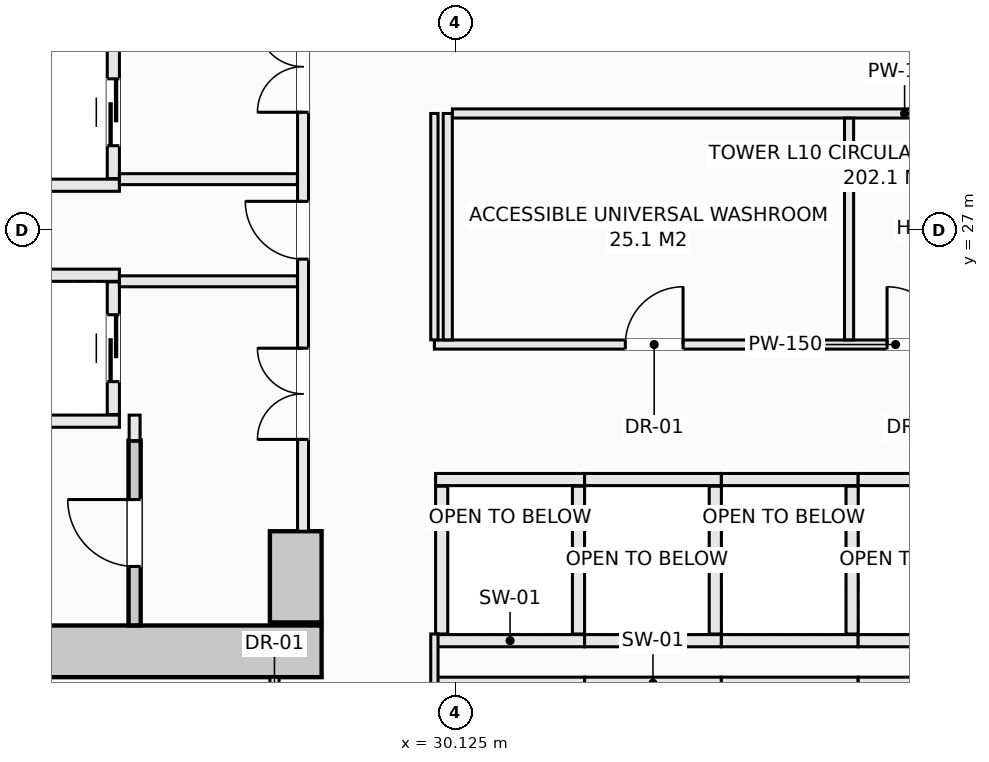
"""IFC4 building model, lengths in metres.
Left out: names, types, materials, properties, quantities, classifications, styles, units other than length and angle.
Written with IfcOpenShell. Run it as: python <this file> out.ifc"""

import sys

from ifc_helpers import new_model, si_unit, direction, frame, frame_2d, origin, place, context, subcontext, project, spatial, rectangle, extrude, element, fill, save


model = new_model("IFC4")
c1 = context("Model", 3, precision=1e-05, world=origin(), true_north=direction((0.0, 1.0)))
c2 = subcontext(c1, "Body", "Model", "MODEL_VIEW")
j1 = project(units=[si_unit("LENGTHUNIT", "METRE"), si_unit("PLANEANGLEUNIT", "RADIAN")], contexts=[c1])
p1 = place(None, origin())
s1 = spatial("IfcSite", under=j1, at=p1, CompositionType="ELEMENT")
p2 = place(p1, origin())
s2 = spatial("IfcBuilding", under=s1, at=p2, CompositionType="ELEMENT")
p3 = place(p2, frame((0.0, 0.0, 45.75)))
s3 = spatial("IfcBuildingStorey", under=s2, at=p3, CompositionType="ELEMENT", Elevation=45.75)
p4 = place(p3, frame((14.075, 20.075, -0.28), z_axis=(0.0, 0.0, 1.0), x_axis=(1.0, 0.0, 0.0)))
e1 = element("IfcWall", 1, at=p4, inside=s3, PredefinedType="SHEAR", context=c2, shape_type="SweptSolid", body=[
    extrude(rectangle(XDim=13.85, YDim=0.85, at=frame_2d((6.925, 0.0))), origin(), (0.0, 0.0, 1.0), 3.85),
])
p5 = place(p3, frame((27.5, 20.55, -0.28), z_axis=(0.0, 0.0, 1.0), x_axis=(0.0, 1.0, 0.0)))
e2 = element("IfcWall", 2, at=p5, inside=s3, PredefinedType="SHEAR", context=c2, shape_type="SweptSolid", body=[
    extrude(rectangle(XDim=1.5, YDim=0.85, at=frame_2d((0.75, 0.0))), origin(), (0.0, 0.0, 1.0), 3.85),
])
p6 = place(p3, frame((24.85, 20.502, -0.28), z_axis=(0.0, 0.0, 1.0), x_axis=(0.0, 1.0, 0.0)))
e3 = element("IfcWall", 3, at=p6, inside=s3, PredefinedType="SHEAR", context=c2, shape_type="SweptSolid", body=[
    extrude(rectangle(XDim=3.038, YDim=0.2, at=frame_2d((1.519, 0.0))), origin(), (0.0, 0.0, 1.0), 3.85),
])
p7 = place(p6, frame((0.969, 0.0, 0.28)))
e4 = element("IfcOpeningElement", 4, at=p7, cuts=e3, PredefinedType="OPENING", context=c2, shape_type="SweptSolid", body=[
    extrude(rectangle(XDim=1.1, YDim=2.15, at=frame_2d((0.55, 1.075))), frame((0.0, 0.11, 0.0), z_axis=(0.0, -1.0, 0.0), x_axis=(1.0, 0.0, 0.0)), (0.0, 0.0, 1.0), 0.22),
])
p8 = place(p3, frame((22.15, 27.74, 0.0), z_axis=(0.0, 0.0, 1.0), x_axis=(1.0, 0.0, 0.0)))
e5 = element("IfcWall", 5, at=p8, inside=s3, PredefinedType="SOLIDWALL", context=c2, shape_type="SweptSolid", body=[
    extrude(rectangle(XDim=2.45, YDim=0.2, at=frame_2d((1.225, 0.0))), origin(), (0.0, 0.0, 1.0), 3.57),
])
p9 = place(p3, frame((24.5, 27.85, 0.0), z_axis=(0.0, 0.0, 1.0), x_axis=(0.0, 1.0, 0.0)))
e6 = element("IfcWall", 6, at=p9, inside=s3, PredefinedType="SOLIDWALL", context=c2, shape_type="SweptSolid", body=[
    extrude(rectangle(XDim=2.18, YDim=0.2, at=frame_2d((1.09, 0.0))), origin(), (0.0, 0.0, 1.0), 3.57),
])
p10 = place(p9, frame((0.54, 0.0, 0.0)))
e7 = element("IfcOpeningElement", 7, at=p10, cuts=e6, PredefinedType="OPENING", context=c2, shape_type="SweptSolid", body=[
    extrude(rectangle(XDim=1.1, YDim=2.2, at=frame_2d((0.55, 1.1))), frame((0.0, 0.11, 0.0), z_axis=(0.0, -1.0, 0.0), x_axis=(1.0, 0.0, 0.0)), (0.0, 0.0, 1.0), 0.22),
])
for number, where, z_axis, x_axis in (
    (8, (22.15, 26.26, 0.0), (0.0, 0.0, 1.0), (1.0, 0.0, 0.0)),
    (9, (22.15, 23.86, 0.0), (0.0, 0.0, 1.0), (1.0, 0.0, 0.0)),
):
    element("IfcWall", number, at=place(p3, frame(where, z_axis=z_axis, x_axis=x_axis)), inside=s3, PredefinedType="SOLIDWALL", context=c2, shape_type="SweptSolid", body=[
        extrude(rectangle(XDim=2.45, YDim=0.2, at=frame_2d((1.225, 0.0))), origin(), (0.0, 0.0, 1.0), 3.57),
    ])
p11 = place(p3, frame((24.5, 23.97, 0.0), z_axis=(0.0, 0.0, 1.0), x_axis=(0.0, 1.0, 0.0)))
e10 = element("IfcWall", 10, at=p11, inside=s3, PredefinedType="SOLIDWALL", context=c2, shape_type="SweptSolid", body=[
    extrude(rectangle(XDim=2.18, YDim=0.2, at=frame_2d((1.09, 0.0))), origin(), (0.0, 0.0, 1.0), 3.57),
])
p12 = place(p11, frame((0.54, 0.0, 0.0)))
e11 = element("IfcOpeningElement", 11, at=p12, cuts=e10, PredefinedType="OPENING", context=c2, shape_type="SweptSolid", body=[
    extrude(rectangle(XDim=1.1, YDim=2.2, at=frame_2d((0.55, 1.1))), frame((0.0, 0.11, 0.0), z_axis=(0.0, -1.0, 0.0), x_axis=(1.0, 0.0, 0.0)), (0.0, 0.0, 1.0), 0.22),
])
p13 = place(p3, frame((29.8, 19.55, 0.0), z_axis=(0.0, 0.0, 1.0), x_axis=(1.0, 0.0, 0.0)))
e12 = element("IfcWall", 12, at=p13, inside=s3, PredefinedType="SOLIDWALL", context=c2, shape_type="SweptSolid", body=[
    extrude(rectangle(XDim=2.45, YDim=0.2, at=frame_2d((1.225, 0.0))), origin(), (0.0, 0.0, 1.0), 3.57),
])
for number, where, z_axis, x_axis in (
    (13, (32.25, 19.55, 0.0), (0.0, 0.0, 1.0), (1.0, 0.0, 0.0)),
    (14, (34.5, 19.55, 0.0), (0.0, 0.0, 1.0), (1.0, 0.0, 0.0)),
    (15, (36.75, 19.55, 0.0), (0.0, 0.0, 1.0), (1.0, 0.0, 0.0)),
):
    element("IfcWall", number, at=place(p3, frame(where, z_axis=z_axis, x_axis=x_axis)), inside=s3, PredefinedType="SOLIDWALL", context=c2, shape_type="SweptSolid", body=[
        extrude(rectangle(XDim=2.25, YDim=0.2, at=frame_2d((1.125, 0.0))), origin(), (0.0, 0.0, 1.0), 3.57),
    ])
for number, where, z_axis, x_axis in (
    (16, (29.8, 22.9, 0.0), (0.0, 0.0, 1.0), (1.0, 0.0, 0.0)),
    (17, (29.8, 20.25, 0.0), (0.0, 0.0, 1.0), (1.0, 0.0, 0.0)),
):
    element("IfcWall", number, at=place(p3, frame(where, z_axis=z_axis, x_axis=x_axis)), inside=s3, PredefinedType="SOLIDWALL", context=c2, shape_type="SweptSolid", body=[
        extrude(rectangle(XDim=2.45, YDim=0.2, at=frame_2d((1.225, 0.0))), origin(), (0.0, 0.0, 1.0), 3.57),
    ])
for number, where, z_axis, x_axis in (
    (18, (29.9, 20.36, 0.0), (0.0, 0.0, 1.0), (0.0, 1.0, 0.0)),
    (19, (32.15, 20.36, 0.0), (0.0, 0.0, 1.0), (0.0, 1.0, 0.0)),
):
    element("IfcWall", number, at=place(p3, frame(where, z_axis=z_axis, x_axis=x_axis)), inside=s3, PredefinedType="SOLIDWALL", context=c2, shape_type="SweptSolid", body=[
        extrude(rectangle(XDim=2.43, YDim=0.2, at=frame_2d((1.215, 0.0))), origin(), (0.0, 0.0, 1.0), 3.57),
    ])
for number, where, z_axis, x_axis in (
    (20, (32.25, 22.9, 0.0), (0.0, 0.0, 1.0), (1.0, 0.0, 0.0)),
    (21, (32.25, 20.25, 0.0), (0.0, 0.0, 1.0), (1.0, 0.0, 0.0)),
):
    element("IfcWall", number, at=place(p3, frame(where, z_axis=z_axis, x_axis=x_axis)), inside=s3, PredefinedType="SOLIDWALL", context=c2, shape_type="SweptSolid", body=[
        extrude(rectangle(XDim=2.25, YDim=0.2, at=frame_2d((1.125, 0.0))), origin(), (0.0, 0.0, 1.0), 3.57),
    ])
p14 = place(p3, frame((34.4, 20.36, 0.0), z_axis=(0.0, 0.0, 1.0), x_axis=(0.0, 1.0, 0.0)))
e22 = element("IfcWall", 22, at=p14, inside=s3, PredefinedType="SOLIDWALL", context=c2, shape_type="SweptSolid", body=[
    extrude(rectangle(XDim=2.43, YDim=0.2, at=frame_2d((1.215, 0.0))), origin(), (0.0, 0.0, 1.0), 3.57),
])
for number, where, z_axis, x_axis in (
    (23, (34.5, 22.9, 0.0), (0.0, 0.0, 1.0), (1.0, 0.0, 0.0)),
    (24, (34.5, 20.25, 0.0), (0.0, 0.0, 1.0), (1.0, 0.0, 0.0)),
):
    element("IfcWall", number, at=place(p3, frame(where, z_axis=z_axis, x_axis=x_axis)), inside=s3, PredefinedType="SOLIDWALL", context=c2, shape_type="SweptSolid", body=[
        extrude(rectangle(XDim=2.25, YDim=0.2, at=frame_2d((1.125, 0.0))), origin(), (0.0, 0.0, 1.0), 3.57),
    ])
p15 = place(p3, frame((36.65, 20.36, 0.0), z_axis=(0.0, 0.0, 1.0), x_axis=(0.0, 1.0, 0.0)))
e25 = element("IfcWall", 25, at=p15, inside=s3, PredefinedType="SOLIDWALL", context=c2, shape_type="SweptSolid", body=[
    extrude(rectangle(XDim=2.43, YDim=0.2, at=frame_2d((1.215, 0.0))), origin(), (0.0, 0.0, 1.0), 3.57),
])
for number, where, z_axis, x_axis in (
    (26, (36.75, 22.9, 0.0), (0.0, 0.0, 1.0), (1.0, 0.0, 0.0)),
    (27, (36.75, 20.25, 0.0), (0.0, 0.0, 1.0), (1.0, 0.0, 0.0)),
):
    element("IfcWall", number, at=place(p3, frame(where, z_axis=z_axis, x_axis=x_axis)), inside=s3, PredefinedType="SOLIDWALL", context=c2, shape_type="SweptSolid", body=[
        extrude(rectangle(XDim=2.25, YDim=0.2, at=frame_2d((1.125, 0.0))), origin(), (0.0, 0.0, 1.0), 3.57),
    ])
p16 = place(p3, frame((24.85, 23.54, 0.0), z_axis=(0.0, 0.0, 1.0), x_axis=(0.0, 1.0, 0.0)))
e28 = element("IfcWall", 28, at=p16, inside=s3, PredefinedType="SOLIDWALL", context=c2, shape_type="SweptSolid", body=[
    extrude(rectangle(XDim=0.42, YDim=0.18, at=frame_2d((0.21, 0.0))), origin(), (0.0, 0.0, 1.0), 3.57),
])
p17 = place(p3, frame((27.62, 22.05, 0.0), z_axis=(0.0, 0.0, 1.0), x_axis=(0.0, 1.0, 0.0)))
e29 = element("IfcWall", 29, at=p17, inside=s3, PredefinedType="SOLIDWALL", context=c2, shape_type="SweptSolid", body=[
    extrude(rectangle(XDim=9.9, YDim=0.18, at=frame_2d((4.95, 0.0))), origin(), (0.0, 0.0, 1.0), 2.662),
])
p18 = place(p17, frame((4.475, 0.0, 0.0)))
e30 = element("IfcOpeningElement", 30, at=p18, cuts=e29, PredefinedType="OPENING", context=c2, shape_type="SweptSolid", body=[
    extrude(rectangle(XDim=0.95, YDim=2.1, at=frame_2d((0.475, 1.05))), frame((0.0, 0.1, 0.0), z_axis=(0.0, -1.0, 0.0), x_axis=(1.0, 0.0, 0.0)), (0.0, 0.0, 1.0), 0.2),
])
p19 = place(p17, frame((6.89, 0.0, 0.0)))
e31 = element("IfcOpeningElement", 31, at=p19, cuts=e29, PredefinedType="OPENING", context=c2, shape_type="SweptSolid", body=[
    extrude(rectangle(XDim=1.5, YDim=2.2, at=frame_2d((0.75, 1.1))), frame((0.0, 0.1, 0.0), z_axis=(0.0, -1.0, 0.0), x_axis=(1.0, 0.0, 0.0)), (0.0, 0.0, 1.0), 0.2),
])
p20 = place(p17, frame((1.51, 0.0, 0.0)))
e32 = element("IfcOpeningElement", 32, at=p20, cuts=e29, PredefinedType="OPENING", context=c2, shape_type="SweptSolid", body=[
    extrude(rectangle(XDim=1.5, YDim=2.2, at=frame_2d((0.75, 1.1))), frame((0.0, 0.1, 0.0), z_axis=(0.0, -1.0, 0.0), x_axis=(1.0, 0.0, 0.0)), (0.0, 0.0, 1.0), 0.2),
])
for number, where, z_axis, x_axis in (
    (33, (24.6, 27.84, 0.0), (0.0, 0.0, 1.0), (1.0, 0.0, 0.0)),
    (34, (24.6, 26.16, 0.0), (0.0, 0.0, 1.0), (1.0, 0.0, 0.0)),
):
    element("IfcWall", number, at=place(p3, frame(where, z_axis=z_axis, x_axis=x_axis)), inside=s3, PredefinedType="SOLIDWALL", context=c2, shape_type="SweptSolid", body=[
        extrude(rectangle(XDim=2.928, YDim=0.18, at=frame_2d((1.464, 0.0))), origin(), (0.0, 0.0, 1.0), 3.57),
    ])
p21 = place(p3, frame((27.15, 17.127, 0.0), z_axis=(0.0, 0.0, 1.0), x_axis=(0.0, 1.0, 0.0)))
e35 = element("IfcWall", 35, at=p21, inside=s3, PredefinedType="PARTITIONING", context=c2, shape_type="SweptSolid", body=[
    extrude(rectangle(XDim=2.521, YDim=0.15, at=frame_2d((1.26, 0.0))), origin(), (0.0, 0.0, 1.0), 3.57),
])
p22 = place(p21, frame((0.785, 0.0, 0.0)))
e36 = element("IfcOpeningElement", 36, at=p22, cuts=e35, PredefinedType="OPENING", context=c2, shape_type="SweptSolid", body=[
    extrude(rectangle(XDim=0.95, YDim=2.1, at=frame_2d((0.475, 1.05))), frame((0.0, 0.085, 0.0), z_axis=(0.0, -1.0, 0.0), x_axis=(1.0, 0.0, 0.0)), (0.0, 0.0, 1.0), 0.17),
])
p23 = place(p3, frame((29.78, 25.12, 0.0), z_axis=(0.0, 0.0, 1.0), x_axis=(1.0, 0.0, 0.0)))
e37 = element("IfcWall", 37, at=p23, inside=s3, PredefinedType="PARTITIONING", context=c2, shape_type="SweptSolid", body=[
    extrude(rectangle(XDim=15.17, YDim=0.15, at=frame_2d((7.585, 0.0))), origin(), (0.0, 0.0, 1.0), 3.57),
])
p24 = place(p23, frame((3.14, 0.0, 0.0)))
e38 = element("IfcOpeningElement", 38, at=p24, cuts=e37, PredefinedType="OPENING", context=c2, shape_type="SweptSolid", body=[
    extrude(rectangle(XDim=0.95, YDim=2.1, at=frame_2d((0.475, 1.05))), frame((0.0, 0.085, 0.0), z_axis=(0.0, -1.0, 0.0), x_axis=(1.0, 0.0, 0.0)), (0.0, 0.0, 1.0), 0.17),
])
p25 = place(p23, frame((7.445, 0.0, 0.0)))
e39 = element("IfcOpeningElement", 39, at=p25, cuts=e37, PredefinedType="OPENING", context=c2, shape_type="SweptSolid", body=[
    extrude(rectangle(XDim=0.95, YDim=2.1, at=frame_2d((0.475, 1.05))), frame((0.0, 0.085, 0.0), z_axis=(0.0, -1.0, 0.0), x_axis=(1.0, 0.0, 0.0)), (0.0, 0.0, 1.0), 0.17),
])
p26 = place(p23, frame((10.995, 0.0, 0.0)))
e40 = element("IfcOpeningElement", 40, at=p26, cuts=e37, PredefinedType="OPENING", context=c2, shape_type="SweptSolid", body=[
    extrude(rectangle(XDim=0.95, YDim=2.1, at=frame_2d((0.475, 1.05))), frame((0.0, 0.085, 0.0), z_axis=(0.0, -1.0, 0.0), x_axis=(1.0, 0.0, 0.0)), (0.0, 0.0, 1.0), 0.17),
])
p27 = place(p3, frame((30.0, 25.197, 0.0), z_axis=(0.0, 0.0, 1.0), x_axis=(0.0, 1.0, 0.0)))
e41 = element("IfcWall", 41, at=p27, inside=s3, PredefinedType="PARTITIONING", context=c2, shape_type="SweptSolid", body=[
    extrude(rectangle(XDim=3.723, YDim=0.15, at=frame_2d((1.861, 0.0))), origin(), (0.0, 0.0, 1.0), 3.57),
])
p28 = place(p3, frame((30.077, 28.92, 0.0), z_axis=(0.0, 0.0, 1.0), x_axis=(1.0, 0.0, 0.0)))
e42 = element("IfcWall", 42, at=p28, inside=s3, PredefinedType="PARTITIONING", context=c2, shape_type="SweptSolid", body=[
    extrude(rectangle(XDim=14.873, YDim=0.15, at=frame_2d((7.437, 0.0))), origin(), (0.0, 0.0, 1.0), 3.57),
])
p29 = place(p3, frame((36.6, 25.197, 0.0), z_axis=(0.0, 0.0, 1.0), x_axis=(0.0, 1.0, 0.0)))
e43 = element("IfcWall", 43, at=p29, inside=s3, PredefinedType="PARTITIONING", context=c2, shape_type="SweptSolid", body=[
    extrude(rectangle(XDim=3.646, YDim=0.15, at=frame_2d((1.823, 0.0))), origin(), (0.0, 0.0, 1.0), 3.57),
])
p30 = place(p3, frame((29.78, 19.44, 0.0), z_axis=(0.0, 0.0, 1.0), x_axis=(0.0, 1.0, 0.0)))
e44 = element("IfcWall", 44, at=p30, inside=s3, PredefinedType="PARTITIONING", context=c2, shape_type="SweptSolid", body=[
    extrude(rectangle(XDim=0.92, YDim=0.12, at=frame_2d((0.46, 0.0))), origin(), (0.0, 0.0, 1.0), 3.57),
])
p31 = place(p3, frame((29.78, 25.197, 0.0), z_axis=(0.0, 0.0, 1.0), x_axis=(0.0, 1.0, 0.0)))
e45 = element("IfcWall", 45, at=p31, inside=s3, PredefinedType="PARTITIONING", context=c2, shape_type="SweptSolid", body=[
    extrude(rectangle(XDim=3.723, YDim=0.12, at=frame_2d((1.861, 0.0))), origin(), (0.0, 0.0, 1.0), 3.57),
])
p32 = place(p7, origin())
e46 = element("IfcDoor", 46, at=p32, inside=s3, OperationType="SINGLE_SWING_RIGHT", PredefinedType="DOOR", context=c2, shape_type="SweptSolid", body=[
    extrude(rectangle(XDim=1.1, YDim=2.15, at=frame_2d((0.55, 1.075))), frame((0.0, 0.025, 0.0), z_axis=(0.0, -1.0, 0.0), x_axis=(1.0, 0.0, 0.0)), (0.0, 0.0, 1.0), 0.05),
])
fill(e4, e46)
p33 = place(p10, origin())
e47 = element("IfcDoor", 47, at=p33, inside=s3, OperationType="SLIDING_TO_LEFT", PredefinedType="DOOR", context=c2, shape_type="SweptSolid", body=[
    extrude(rectangle(XDim=1.1, YDim=2.2, at=frame_2d((0.55, 1.1))), frame((0.0, 0.025, 0.0), z_axis=(0.0, -1.0, 0.0), x_axis=(1.0, 0.0, 0.0)), (0.0, 0.0, 1.0), 0.05),
])
fill(e7, e47)
p34 = place(p12, origin())
e48 = element("IfcDoor", 48, at=p34, inside=s3, OperationType="SLIDING_TO_LEFT", PredefinedType="DOOR", context=c2, shape_type="SweptSolid", body=[
    extrude(rectangle(XDim=1.1, YDim=2.2, at=frame_2d((0.55, 1.1))), frame((0.0, 0.025, 0.0), z_axis=(0.0, -1.0, 0.0), x_axis=(1.0, 0.0, 0.0)), (0.0, 0.0, 1.0), 0.05),
])
fill(e11, e48)
p35 = place(p18, origin())
e49 = element("IfcDoor", 49, at=p35, inside=s3, OperationType="SINGLE_SWING_RIGHT", PredefinedType="DOOR", context=c2, shape_type="SweptSolid", body=[
    extrude(rectangle(XDim=0.95, YDim=2.1, at=frame_2d((0.475, 1.05))), frame((0.0, 0.025, 0.0), z_axis=(0.0, -1.0, 0.0), x_axis=(1.0, 0.0, 0.0)), (0.0, 0.0, 1.0), 0.05),
])
fill(e30, e49)
p36 = place(p19, origin())
e50 = element("IfcDoor", 50, at=p36, inside=s3, OperationType="DOUBLE_DOOR_SINGLE_SWING", PredefinedType="DOOR", context=c2, shape_type="SweptSolid", body=[
    extrude(rectangle(XDim=1.5, YDim=2.2, at=frame_2d((0.75, 1.1))), frame((0.0, 0.025, 0.0), z_axis=(0.0, -1.0, 0.0), x_axis=(1.0, 0.0, 0.0)), (0.0, 0.0, 1.0), 0.05),
])
fill(e31, e50)
p37 = place(p20, origin())
e51 = element("IfcDoor", 51, at=p37, inside=s3, OperationType="DOUBLE_DOOR_SINGLE_SWING", PredefinedType="DOOR", context=c2, shape_type="SweptSolid", body=[
    extrude(rectangle(XDim=1.5, YDim=2.2, at=frame_2d((0.75, 1.1))), frame((0.0, 0.025, 0.0), z_axis=(0.0, -1.0, 0.0), x_axis=(1.0, 0.0, 0.0)), (0.0, 0.0, 1.0), 0.05),
])
fill(e32, e51)
p38 = place(p24, origin())
e52 = element("IfcDoor", 52, at=p38, inside=s3, OperationType="SINGLE_SWING_RIGHT", PredefinedType="DOOR", context=c2, shape_type="SweptSolid", body=[
    extrude(rectangle(XDim=0.95, YDim=2.1, at=frame_2d((0.475, 1.05))), frame((0.0, 0.025, 0.0), z_axis=(0.0, -1.0, 0.0), x_axis=(1.0, 0.0, 0.0)), (0.0, 0.0, 1.0), 0.05),
])
fill(e38, e52)
p39 = place(p25, origin())
e53 = element("IfcDoor", 53, at=p39, inside=s3, OperationType="SINGLE_SWING_LEFT", PredefinedType="DOOR", context=c2, shape_type="SweptSolid", body=[
    extrude(rectangle(XDim=0.95, YDim=2.1, at=frame_2d((0.475, 1.05))), frame((0.0, 0.025, 0.0), z_axis=(0.0, -1.0, 0.0), x_axis=(1.0, 0.0, 0.0)), (0.0, 0.0, 1.0), 0.05),
])
fill(e39, e53)
save(model, sys.argv[1])
